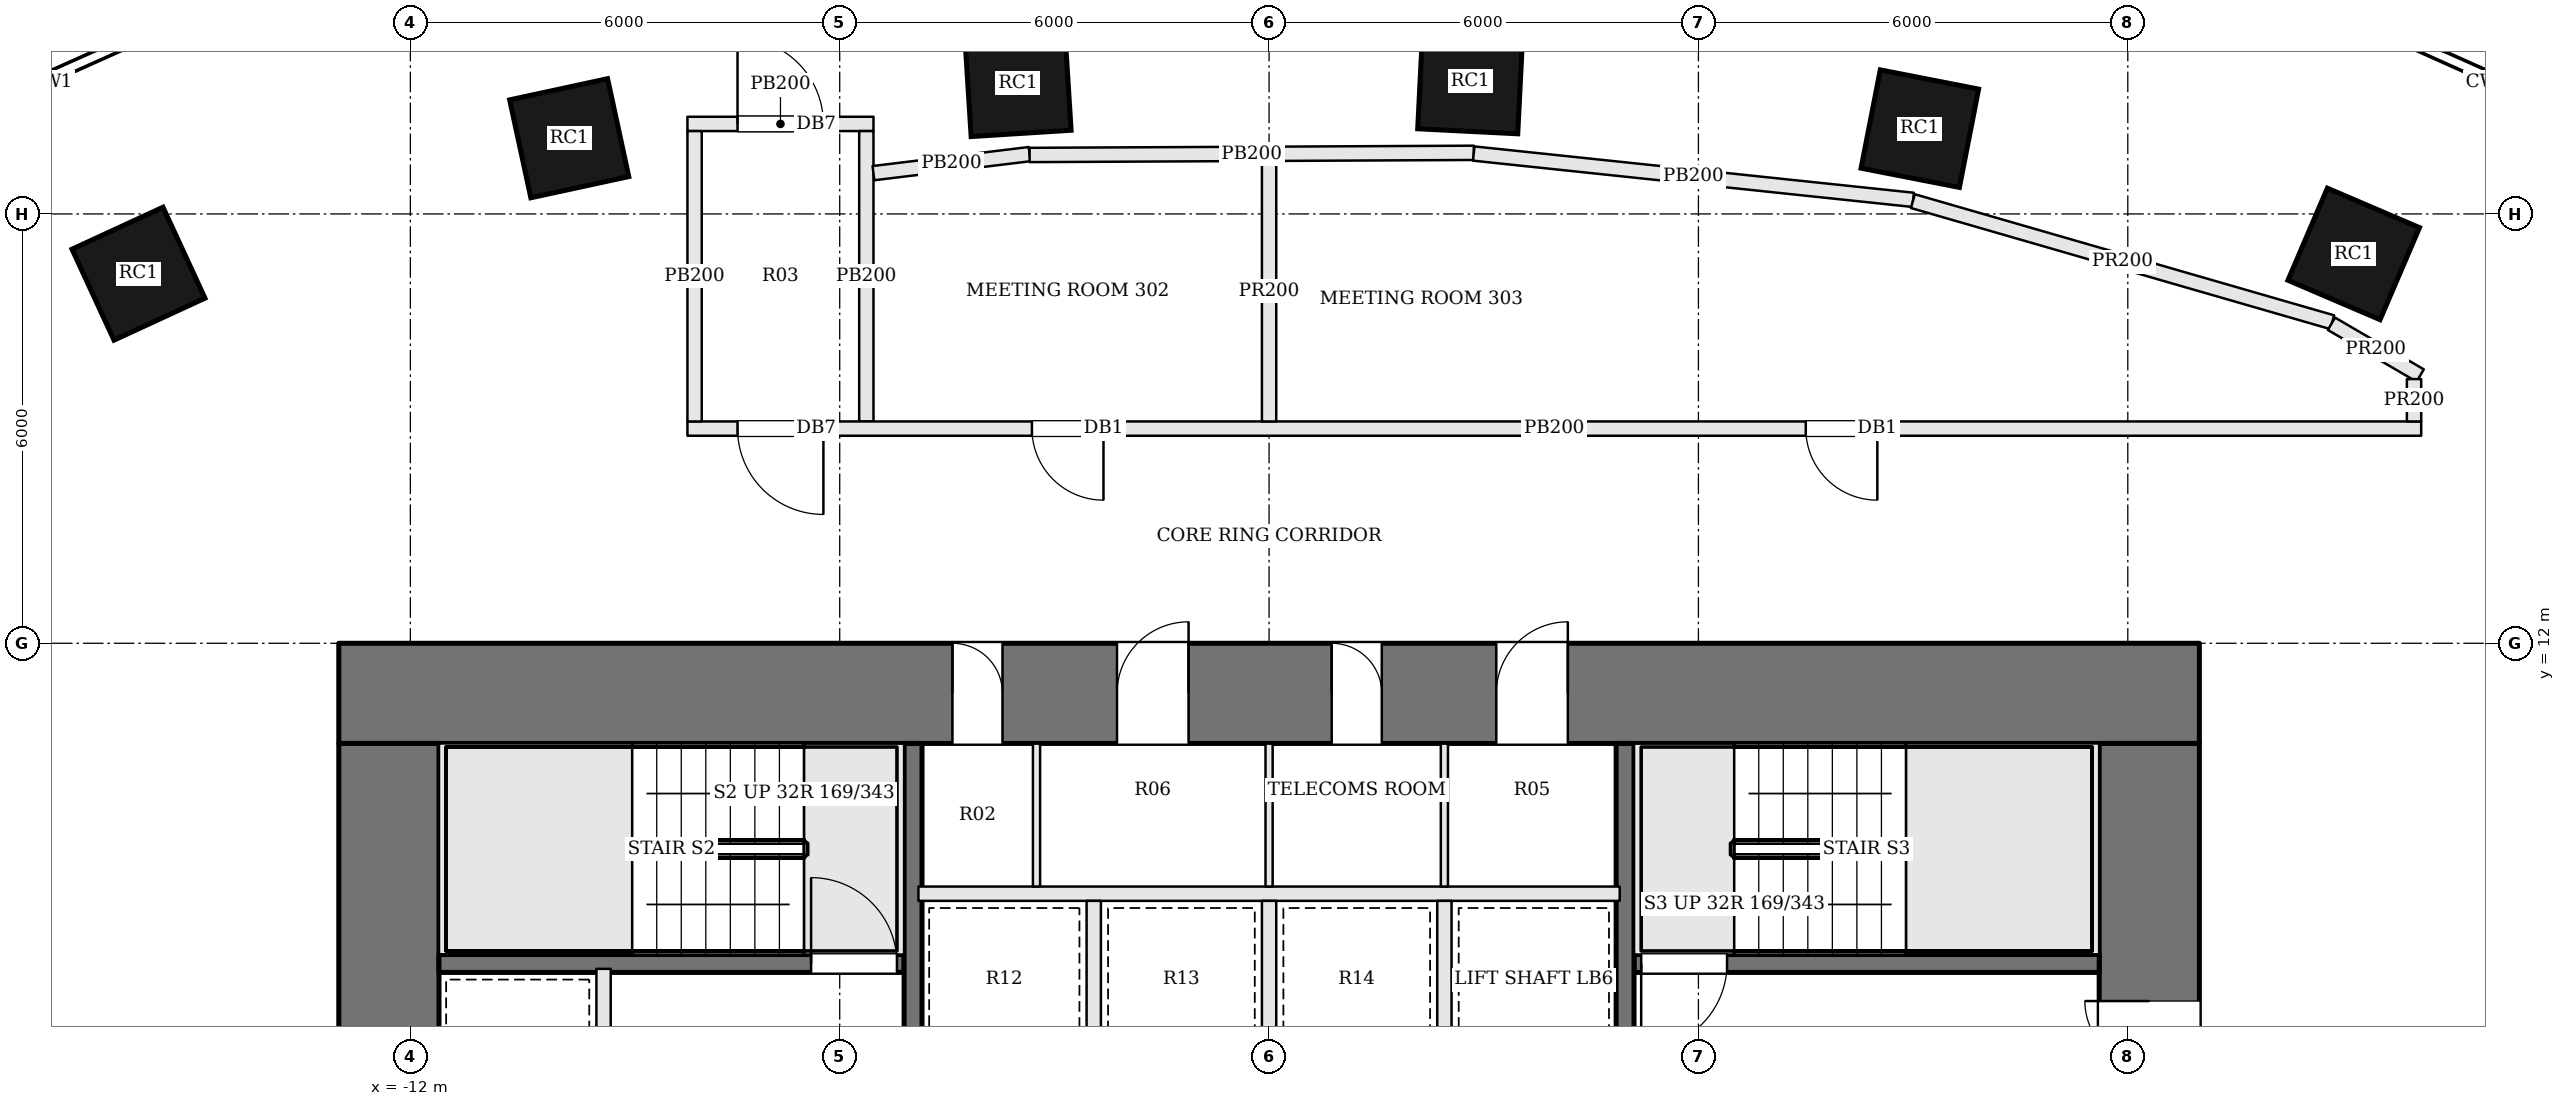
"""IFC4 building model, lengths in metres.
Left out: names, types, materials, properties, quantities, classifications, styles, units other than length and angle.
Written with IfcOpenShell. Run it as: python <this file> out.ifc"""

import sys

from ifc_helpers import new_model, si_unit, direction, frame, frame_2d, origin, origin_2d, place, context, subcontext, project, spatial, rectangle, extrude, element, fill, save


model = new_model("IFC4")
c1 = context("Model", 3, precision=1e-05, world=origin(), true_north=direction((0.0, 1.0)))
c2 = subcontext(c1, "Body", "Model", "MODEL_VIEW")
j1 = project(units=[si_unit("LENGTHUNIT", "METRE"), si_unit("PLANEANGLEUNIT", "RADIAN")], contexts=[c1])
p1 = place(None, origin())
s1 = spatial("IfcSite", under=j1, at=p1, CompositionType="ELEMENT")
p2 = place(p1, origin())
s2 = spatial("IfcBuilding", under=s1, at=p2, CompositionType="ELEMENT")
p3 = place(p2, frame((0.0, 0.0, 22.8)))
s3 = spatial("IfcBuildingStorey", under=s2, at=p3, CompositionType="ELEMENT", Elevation=22.8)
p4 = place(p3, frame((-13.0, 11.3, 0.0), z_axis=(0.0, 0.0, 1.0), x_axis=(1.0, 0.0, 0.0)))
e1 = element("IfcWall", 1, at=p4, inside=s3, PredefinedType="SHEAR", context=c2, shape_type="SweptSolid", body=[
    extrude(rectangle(XDim=26.0, YDim=1.4, at=frame_2d((13.0, 0.0))), origin(), (0.0, 0.0, 1.0), 5.4),
])
p5 = place(p4, frame((8.575, 0.0, 0.0)))
e2 = element("IfcOpeningElement", 2, at=p5, cuts=e1, PredefinedType="OPENING", context=c2, shape_type="SweptSolid", body=[
    extrude(rectangle(XDim=0.7, YDim=2.1, at=frame_2d((0.35, 1.05))), frame((0.0, 0.71, 0.0), z_axis=(0.0, -1.0, 0.0), x_axis=(1.0, 0.0, 0.0)), (0.0, 0.0, 1.0), 1.42),
])
p6 = place(p4, frame((10.875, 0.0, 0.0)))
e3 = element("IfcOpeningElement", 3, at=p6, cuts=e1, PredefinedType="OPENING", context=c2, shape_type="SweptSolid", body=[
    extrude(rectangle(XDim=1.0, YDim=2.1, at=frame_2d((0.5, 1.05))), frame((0.0, 0.71, 0.0), z_axis=(0.0, -1.0, 0.0), x_axis=(1.0, 0.0, 0.0)), (0.0, 0.0, 1.0), 1.42),
])
p7 = place(p4, frame((13.875, 0.0, 0.0)))
e4 = element("IfcOpeningElement", 4, at=p7, cuts=e1, PredefinedType="OPENING", context=c2, shape_type="SweptSolid", body=[
    extrude(rectangle(XDim=0.7, YDim=2.1, at=frame_2d((0.35, 1.05))), frame((0.0, 0.71, 0.0), z_axis=(0.0, -1.0, 0.0), x_axis=(1.0, 0.0, 0.0)), (0.0, 0.0, 1.0), 1.42),
])
p8 = place(p4, frame((16.175, 0.0, 0.0)))
e5 = element("IfcOpeningElement", 5, at=p8, cuts=e1, PredefinedType="OPENING", context=c2, shape_type="SweptSolid", body=[
    extrude(rectangle(XDim=1.0, YDim=2.1, at=frame_2d((0.5, 1.05))), frame((0.0, 0.71, 0.0), z_axis=(0.0, -1.0, 0.0), x_axis=(1.0, 0.0, 0.0)), (0.0, 0.0, 1.0), 1.42),
])
p9 = place(p3, frame((12.3, -1.6, 0.0), z_axis=(0.0, 0.0, 1.0), x_axis=(0.0, 1.0, 0.0)))
e6 = element("IfcWall", 6, at=p9, inside=s3, PredefinedType="SHEAR", context=c2, shape_type="SweptSolid", body=[
    extrude(rectangle(XDim=12.2, YDim=1.4, at=frame_2d((6.1, 0.0))), origin(), (0.0, 0.0, 1.0), 5.4),
])
p10 = place(p9, frame((6.8, 0.0, 0.0)))
e7 = element("IfcOpeningElement", 7, at=p10, cuts=e6, PredefinedType="OPENING", context=c2, shape_type="SweptSolid", body=[
    extrude(rectangle(XDim=1.8, YDim=2.1, at=frame_2d((0.9, 1.05))), frame((0.0, 0.71, 0.0), z_axis=(0.0, -1.0, 0.0), x_axis=(1.0, 0.0, 0.0)), (0.0, 0.0, 1.0), 1.42),
])
p11 = place(p3, frame((-12.3, -1.6, 0.0), z_axis=(0.0, 0.0, 1.0), x_axis=(0.0, 1.0, 0.0)))
e8 = element("IfcWall", 8, at=p11, inside=s3, PredefinedType="SHEAR", context=c2, shape_type="SweptSolid", body=[
    extrude(rectangle(XDim=12.2, YDim=1.4, at=frame_2d((6.1, 0.0))), origin(), (0.0, 0.0, 1.0), 5.4),
])
p12 = place(p11, frame((3.6, 0.0, 0.0)))
e9 = element("IfcOpeningElement", 9, at=p12, cuts=e8, PredefinedType="OPENING", context=c2, shape_type="SweptSolid", body=[
    extrude(rectangle(XDim=1.8, YDim=2.1, at=frame_2d((0.9, 1.05))), frame((0.0, 0.71, 0.0), z_axis=(0.0, -1.0, 0.0), x_axis=(1.0, 0.0, 0.0)), (0.0, 0.0, 1.0), 1.42),
])
for number, where, z_axis, x_axis in (
    (10, (15.157, 17.441, 0.0), (0.0, 0.0, 1.0), (-0.919, 0.394, 0.0)),
    (11, (9.094, 19.192, 0.0), (0.0, 0.0, 1.0), (-0.981, 0.192, 0.0)),
    (12, (2.811, 19.854, 0.0), (0.0, 0.0, 1.0), (-0.999, 0.05, 0.0)),
    (13, (-3.509, 19.824, 0.0), (0.0, 0.0, 1.0), (-0.998, -0.063, 0.0)),
    (14, (-9.78, 19.058, 0.0), (0.0, 0.0, 1.0), (-0.977, -0.211, 0.0)),
    (15, (-15.799, 17.165, 0.0), (0.0, 0.0, 1.0), (-0.908, -0.419, 0.0)),
):
    element("IfcColumn", number, at=place(p3, frame(where, z_axis=z_axis, x_axis=x_axis)), inside=s3, PredefinedType="COLUMN", context=c2, shape_type="SweptSolid", body=[
        extrude(rectangle(XDim=1.4, YDim=1.4, at=origin_2d()), origin(), (0.0, 0.0, 1.0), 5.4),
    ])
p13 = place(p3, frame((11.6, 7.525, 0.0), z_axis=(0.0, 0.0, 1.0), x_axis=(-1.0, 0.0, 0.0)))
e16 = element("IfcWall", 16, at=p13, inside=s3, PredefinedType="SOLIDWALL", context=c2, shape_type="SweptSolid", body=[
    extrude(rectangle(XDim=6.5, YDim=0.25, at=frame_2d((3.25, 0.0))), origin(), (0.0, 0.0, 1.0), 5.15),
])
p14 = place(p13, frame((5.2, 0.0, 0.0)))
e17 = element("IfcOpeningElement", 17, at=p14, cuts=e16, PredefinedType="OPENING", context=c2, shape_type="SweptSolid", body=[
    extrude(rectangle(XDim=1.2, YDim=2.1, at=frame_2d((0.6, 1.05))), frame((0.0, 0.135, 0.0), z_axis=(0.0, -1.0, 0.0), x_axis=(1.0, 0.0, 0.0)), (0.0, 0.0, 1.0), 0.27),
])
p15 = place(p3, frame((-11.6, 7.525, 0.0), z_axis=(0.0, 0.0, 1.0), x_axis=(1.0, 0.0, 0.0)))
e18 = element("IfcWall", 18, at=p15, inside=s3, PredefinedType="SOLIDWALL", context=c2, shape_type="SweptSolid", body=[
    extrude(rectangle(XDim=6.5, YDim=0.25, at=frame_2d((3.25, 0.0))), origin(), (0.0, 0.0, 1.0), 5.15),
])
p16 = place(p15, frame((5.2, 0.0, 0.0)))
e19 = element("IfcOpeningElement", 19, at=p16, cuts=e18, PredefinedType="OPENING", context=c2, shape_type="SweptSolid", body=[
    extrude(rectangle(XDim=1.2, YDim=2.1, at=frame_2d((0.6, 1.05))), frame((0.0, 0.135, 0.0), z_axis=(0.0, -1.0, 0.0), x_axis=(1.0, 0.0, 0.0)), (0.0, 0.0, 1.0), 0.27),
])
p17 = place(p3, frame((-9.3, 4.45, 0.0), z_axis=(0.0, 0.0, 1.0), x_axis=(0.0, 1.0, 0.0)))
e20 = element("IfcWall", 20, at=p17, inside=s3, PredefinedType="SOLIDWALL", context=c2, shape_type="SweptSolid", body=[
    extrude(rectangle(XDim=3.0, YDim=0.2, at=frame_2d((1.5, 0.0))), origin(), (0.0, 0.0, 1.0), 5.15),
])
p18 = place(p3, frame((-4.975, -1.6, 0.0), z_axis=(0.0, 0.0, 1.0), x_axis=(0.0, 1.0, 0.0)))
e21 = element("IfcWall", 21, at=p18, inside=s3, PredefinedType="SOLIDWALL", context=c2, shape_type="SweptSolid", body=[
    extrude(rectangle(XDim=12.2, YDim=0.25, at=frame_2d((6.1, 0.0))), origin(), (0.0, 0.0, 1.0), 5.15),
])
p19 = place(p18, frame((4.65, 0.0, 0.0)))
e22 = element("IfcOpeningElement", 22, at=p19, cuts=e21, PredefinedType="OPENING", context=c2, shape_type="SweptSolid", body=[
    extrude(rectangle(XDim=1.2, YDim=2.1, at=frame_2d((0.6, 1.05))), frame((0.0, 0.135, 0.0), z_axis=(0.0, -1.0, 0.0), x_axis=(1.0, 0.0, 0.0)), (0.0, 0.0, 1.0), 0.27),
])
p20 = place(p3, frame((4.975, 10.6, 0.0), z_axis=(0.0, 0.0, 1.0), x_axis=(0.0, -1.0, 0.0)))
e23 = element("IfcWall", 23, at=p20, inside=s3, PredefinedType="SOLIDWALL", context=c2, shape_type="SweptSolid", body=[
    extrude(rectangle(XDim=12.2, YDim=0.25, at=frame_2d((6.1, 0.0))), origin(), (0.0, 0.0, 1.0), 5.15),
])
p21 = place(p20, frame((4.65, 0.0, 0.0)))
e24 = element("IfcOpeningElement", 24, at=p21, cuts=e23, PredefinedType="OPENING", context=c2, shape_type="SweptSolid", body=[
    extrude(rectangle(XDim=1.2, YDim=2.1, at=frame_2d((0.6, 1.05))), frame((0.0, 0.135, 0.0), z_axis=(0.0, -1.0, 0.0), x_axis=(1.0, 0.0, 0.0)), (0.0, 0.0, 1.0), 0.27),
])
p22 = place(p3, frame((-4.9, 8.5, 0.0), z_axis=(0.0, 0.0, 1.0), x_axis=(1.0, 0.0, 0.0)))
e25 = element("IfcWall", 25, at=p22, inside=s3, PredefinedType="SOLIDWALL", context=c2, shape_type="SweptSolid", body=[
    extrude(rectangle(XDim=9.8, YDim=0.2, at=frame_2d((4.9, 0.0))), origin(), (0.0, 0.0, 1.0), 5.15),
])
for number, where, z_axis, x_axis in (
    (26, (-2.45, 6.2, 0.0), (0.0, 0.0, 1.0), (0.0, 1.0, 0.0)),
    (27, (0.0, 6.2, 0.0), (0.0, 0.0, 1.0), (0.0, 1.0, 0.0)),
    (28, (2.45, 6.2, 0.0), (0.0, 0.0, 1.0), (0.0, 1.0, 0.0)),
):
    element("IfcWall", number, at=place(p3, frame(where, z_axis=z_axis, x_axis=x_axis)), inside=s3, PredefinedType="SOLIDWALL", context=c2, shape_type="SweptSolid", body=[
        extrude(rectangle(XDim=2.2, YDim=0.2, at=frame_2d((1.1, 0.0))), origin(), (0.0, 0.0, 1.0), 5.15),
    ])
for number, where, z_axis, x_axis in (
    (29, (-3.25, 8.6, 0.0), (0.0, 0.0, 1.0), (0.0, 1.0, 0.0)),
    (30, (0.0, 8.6, 0.0), (0.0, 0.0, 1.0), (0.0, 1.0, 0.0)),
    (31, (2.45, 8.6, 0.0), (0.0, 0.0, 1.0), (0.0, 1.0, 0.0)),
):
    element("IfcWall", number, at=place(p3, frame(where, z_axis=z_axis, x_axis=x_axis)), inside=s3, PredefinedType="PARTITIONING", context=c2, shape_type="SweptSolid", body=[
        extrude(rectangle(XDim=2.0, YDim=0.1, at=frame_2d((1.0, 0.0))), origin(), (0.0, 0.0, 1.0), 5.15),
    ])
p23 = place(p3, frame((-8.128, 19.258, 0.0), z_axis=(0.0, 0.0, 1.0), x_axis=(1.0, 0.0, 0.0)))
e32 = element("IfcWall", 32, at=p23, inside=s3, PredefinedType="PARTITIONING", context=c2, shape_type="SweptSolid", body=[
    extrude(rectangle(XDim=2.6, YDim=0.2, at=frame_2d((1.3, 0.0))), origin(), (0.0, 0.0, 1.0), 4.43),
])
p24 = place(p23, frame((0.7, 0.0, 0.0)))
e33 = element("IfcOpeningElement", 33, at=p24, cuts=e32, PredefinedType="OPENING", context=c2, shape_type="SweptSolid", body=[
    extrude(rectangle(XDim=1.2, YDim=2.1, at=frame_2d((0.6, 1.05))), frame((0.0, 0.11, 0.0), z_axis=(0.0, -1.0, 0.0), x_axis=(1.0, 0.0, 0.0)), (0.0, 0.0, 1.0), 0.22),
])
p25 = place(p3, frame((-5.628, 19.158, 0.0), z_axis=(0.0, 0.0, 1.0), x_axis=(0.0, -1.0, 0.0)))
e34 = element("IfcWall", 34, at=p25, inside=s3, PredefinedType="PARTITIONING", context=c2, shape_type="SweptSolid", body=[
    extrude(rectangle(XDim=4.058, YDim=0.2, at=frame_2d((2.029, 0.0))), origin(), (0.0, 0.0, 1.0), 4.43),
])
p26 = place(p3, frame((16.1, 15.0, 0.0), z_axis=(0.0, 0.0, 1.0), x_axis=(-1.0, 0.0, 0.0)))
e35 = element("IfcWall", 35, at=p26, inside=s3, PredefinedType="PARTITIONING", context=c2, shape_type="SweptSolid", body=[
    extrude(rectangle(XDim=24.228, YDim=0.2, at=frame_2d((12.114, 0.0))), origin(), (0.0, 0.0, 1.0), 4.43),
])
p27 = place(p26, frame((22.328, 0.0, 0.0)))
e36 = element("IfcOpeningElement", 36, at=p27, cuts=e35, PredefinedType="OPENING", context=c2, shape_type="SweptSolid", body=[
    extrude(rectangle(XDim=1.2, YDim=2.1, at=frame_2d((0.6, 1.05))), frame((0.0, 0.11, 0.0), z_axis=(0.0, -1.0, 0.0), x_axis=(1.0, 0.0, 0.0)), (0.0, 0.0, 1.0), 0.22),
])
p28 = place(p26, frame((18.414, 0.0, 0.0)))
e37 = element("IfcOpeningElement", 37, at=p28, cuts=e35, PredefinedType="OPENING", context=c2, shape_type="SweptSolid", body=[
    extrude(rectangle(XDim=1.0, YDim=2.1, at=frame_2d((0.5, 1.05))), frame((0.0, 0.11, 0.0), z_axis=(0.0, -1.0, 0.0), x_axis=(1.0, 0.0, 0.0)), (0.0, 0.0, 1.0), 0.22),
])
p29 = place(p26, frame((7.6, 0.0, 0.0)))
e38 = element("IfcOpeningElement", 38, at=p29, cuts=e35, PredefinedType="OPENING", context=c2, shape_type="SweptSolid", body=[
    extrude(rectangle(XDim=1.0, YDim=2.1, at=frame_2d((0.5, 1.05))), frame((0.0, 0.11, 0.0), z_axis=(0.0, -1.0, 0.0), x_axis=(1.0, 0.0, 0.0)), (0.0, 0.0, 1.0), 0.22),
])
p30 = place(p3, frame((-8.028, 15.1, 0.0), z_axis=(0.0, 0.0, 1.0), x_axis=(0.0, 1.0, 0.0)))
e39 = element("IfcWall", 39, at=p30, inside=s3, PredefinedType="PARTITIONING", context=c2, shape_type="SweptSolid", body=[
    extrude(rectangle(XDim=4.058, YDim=0.2, at=frame_2d((2.029, 0.0))), origin(), (0.0, 0.0, 1.0), 4.43),
])
p31 = place(p3, frame((-5.529, 18.57, 0.0), z_axis=(0.0, 0.0, 1.0), x_axis=(0.992659217013, 0.120944941522, 0.0)))
e40 = element("IfcWall", 40, at=p31, inside=s3, PredefinedType="PARTITIONING", context=c2, shape_type="SweptSolid", body=[
    extrude(rectangle(XDim=2.198, YDim=0.2, at=frame_2d((1.099, 0.0))), origin(), (0.0, 0.0, 1.0), 4.43),
])
p32 = place(p3, frame((-3.346, 18.824, 0.0), z_axis=(0.0, 0.0, 1.0), x_axis=(0.999988297333, 0.004837891778, 0.0)))
e41 = element("IfcWall", 41, at=p32, inside=s3, PredefinedType="PARTITIONING", context=c2, shape_type="SweptSolid", body=[
    extrude(rectangle(XDim=6.207, YDim=0.2, at=frame_2d((3.104, 0.0))), origin(), (0.0, 0.0, 1.0), 4.43),
])
p33 = place(p3, frame((0.0, 18.741, 0.0), z_axis=(0.0, 0.0, 1.0), x_axis=(0.0, -1.0, 0.0)))
e42 = element("IfcWall", 42, at=p33, inside=s3, PredefinedType="PARTITIONING", context=c2, shape_type="SweptSolid", body=[
    extrude(rectangle(XDim=3.641, YDim=0.2, at=frame_2d((1.82, 0.0))), origin(), (0.0, 0.0, 1.0), 4.43),
])
p34 = place(p3, frame((2.86, 18.844, 0.0), z_axis=(0.0, 0.0, 1.0), x_axis=(0.994494179805, -0.10479182379, 0.0)))
e43 = element("IfcWall", 43, at=p34, inside=s3, PredefinedType="PARTITIONING", context=c2, shape_type="SweptSolid", body=[
    extrude(rectangle(XDim=6.174, YDim=0.2, at=frame_2d((3.087, 0.0))), origin(), (0.0, 0.0, 1.0), 4.43),
])
p35 = place(p3, frame((8.997, 18.179, 0.0), z_axis=(0.0, 0.0, 1.0), x_axis=(0.960743591904, -0.277437831982, 0.0)))
e44 = element("IfcWall", 44, at=p35, inside=s3, PredefinedType="PARTITIONING", context=c2, shape_type="SweptSolid", body=[
    extrude(rectangle(XDim=6.098, YDim=0.2, at=frame_2d((3.049, 0.0))), origin(), (0.0, 0.0, 1.0), 4.43),
])
p36 = place(p3, frame((14.846, 16.465, 0.0), z_axis=(0.0, 0.0, 1.0), x_axis=(0.863834413875, -0.503775848375, 0.0)))
e45 = element("IfcWall", 45, at=p36, inside=s3, PredefinedType="PARTITIONING", context=c2, shape_type="SweptSolid", body=[
    extrude(rectangle(XDim=1.436, YDim=0.2, at=frame_2d((0.718, 0.0))), origin(), (0.0, 0.0, 1.0), 4.43),
])
p37 = place(p3, frame((16.0, 15.692, 0.0), z_axis=(0.0, 0.0, 1.0), x_axis=(0.0, -1.0, 0.0)))
e46 = element("IfcWall", 46, at=p37, inside=s3, PredefinedType="PARTITIONING", context=c2, shape_type="SweptSolid", body=[
    extrude(rectangle(XDim=0.592, YDim=0.2, at=frame_2d((0.296, 0.0))), origin(), (0.0, 0.0, 1.0), 4.43),
])
p38 = place(p10, origin())
e47 = element("IfcDoor", 47, at=p38, inside=s3, OperationType="DOUBLE_DOOR_SINGLE_SWING", PredefinedType="DOOR", context=c2, shape_type="SweptSolid", body=[
    extrude(rectangle(XDim=1.8, YDim=2.1, at=frame_2d((0.9, 1.05))), frame((0.0, 0.025, 0.0), z_axis=(0.0, -1.0, 0.0), x_axis=(1.0, 0.0, 0.0)), (0.0, 0.0, 1.0), 0.05),
])
fill(e7, e47)
p39 = place(p14, origin())
e48 = element("IfcDoor", 48, at=p39, inside=s3, OperationType="SINGLE_SWING_RIGHT", PredefinedType="DOOR", context=c2, shape_type="SweptSolid", body=[
    extrude(rectangle(XDim=1.2, YDim=2.1, at=frame_2d((0.6, 1.05))), frame((0.0, 0.025, 0.0), z_axis=(0.0, -1.0, 0.0), x_axis=(1.0, 0.0, 0.0)), (0.0, 0.0, 1.0), 0.05),
])
fill(e17, e48)
p40 = place(p16, origin())
e49 = element("IfcDoor", 49, at=p40, inside=s3, OperationType="SINGLE_SWING_LEFT", PredefinedType="DOOR", context=c2, shape_type="SweptSolid", body=[
    extrude(rectangle(XDim=1.2, YDim=2.1, at=frame_2d((0.6, 1.05))), frame((0.0, 0.025, 0.0), z_axis=(0.0, -1.0, 0.0), x_axis=(1.0, 0.0, 0.0)), (0.0, 0.0, 1.0), 0.05),
])
fill(e19, e49)
p41 = place(p5, origin())
e50 = element("IfcDoor", 50, at=p41, inside=s3, OperationType="SINGLE_SWING_LEFT", PredefinedType="DOOR", context=c2, shape_type="SweptSolid", body=[
    extrude(rectangle(XDim=0.7, YDim=2.1, at=frame_2d((0.35, 1.05))), frame((0.0, 0.025, 0.0), z_axis=(0.0, -1.0, 0.0), x_axis=(1.0, 0.0, 0.0)), (0.0, 0.0, 1.0), 0.05),
])
fill(e2, e50)
p42 = place(p6, origin())
e51 = element("IfcDoor", 51, at=p42, inside=s3, OperationType="SINGLE_SWING_RIGHT", PredefinedType="DOOR", context=c2, shape_type="SweptSolid", body=[
    extrude(rectangle(XDim=1.0, YDim=2.1, at=frame_2d((0.5, 1.05))), frame((0.0, 0.025, 0.0), z_axis=(0.0, -1.0, 0.0), x_axis=(1.0, 0.0, 0.0)), (0.0, 0.0, 1.0), 0.05),
])
fill(e3, e51)
p43 = place(p7, origin())
e52 = element("IfcDoor", 52, at=p43, inside=s3, OperationType="SINGLE_SWING_LEFT", PredefinedType="DOOR", context=c2, shape_type="SweptSolid", body=[
    extrude(rectangle(XDim=0.7, YDim=2.1, at=frame_2d((0.35, 1.05))), frame((0.0, 0.025, 0.0), z_axis=(0.0, -1.0, 0.0), x_axis=(1.0, 0.0, 0.0)), (0.0, 0.0, 1.0), 0.05),
])
fill(e4, e52)
p44 = place(p8, origin())
e53 = element("IfcDoor", 53, at=p44, inside=s3, OperationType="SINGLE_SWING_RIGHT", PredefinedType="DOOR", context=c2, shape_type="SweptSolid", body=[
    extrude(rectangle(XDim=1.0, YDim=2.1, at=frame_2d((0.5, 1.05))), frame((0.0, 0.025, 0.0), z_axis=(0.0, -1.0, 0.0), x_axis=(1.0, 0.0, 0.0)), (0.0, 0.0, 1.0), 0.05),
])
fill(e5, e53)
p45 = place(p27, origin())
e54 = element("IfcDoor", 54, at=p45, inside=s3, OperationType="SINGLE_SWING_LEFT", PredefinedType="DOOR", context=c2, shape_type="SweptSolid", body=[
    extrude(rectangle(XDim=1.2, YDim=2.1, at=frame_2d((0.6, 1.05))), frame((0.0, 0.025, 0.0), z_axis=(0.0, -1.0, 0.0), x_axis=(1.0, 0.0, 0.0)), (0.0, 0.0, 1.0), 0.05),
])
fill(e36, e54)
p46 = place(p24, origin())
e55 = element("IfcDoor", 55, at=p46, inside=s3, OperationType="SINGLE_SWING_LEFT", PredefinedType="DOOR", context=c2, shape_type="SweptSolid", body=[
    extrude(rectangle(XDim=1.2, YDim=2.1, at=frame_2d((0.6, 1.05))), frame((0.0, 0.025, 0.0), z_axis=(0.0, -1.0, 0.0), x_axis=(1.0, 0.0, 0.0)), (0.0, 0.0, 1.0), 0.05),
])
fill(e33, e55)
p47 = place(p28, origin())
e56 = element("IfcDoor", 56, at=p47, inside=s3, OperationType="SINGLE_SWING_LEFT", PredefinedType="DOOR", context=c2, shape_type="SweptSolid", body=[
    extrude(rectangle(XDim=1.0, YDim=2.1, at=frame_2d((0.5, 1.05))), frame((0.0, 0.025, 0.0), z_axis=(0.0, -1.0, 0.0), x_axis=(1.0, 0.0, 0.0)), (0.0, 0.0, 1.0), 0.05),
])
fill(e37, e56)
p48 = place(p29, origin())
e57 = element("IfcDoor", 57, at=p48, inside=s3, OperationType="SINGLE_SWING_LEFT", PredefinedType="DOOR", context=c2, shape_type="SweptSolid", body=[
    extrude(rectangle(XDim=1.0, YDim=2.1, at=frame_2d((0.5, 1.05))), frame((0.0, 0.025, 0.0), z_axis=(0.0, -1.0, 0.0), x_axis=(1.0, 0.0, 0.0)), (0.0, 0.0, 1.0), 0.05),
])
fill(e38, e57)
save(model, sys.argv[1])
